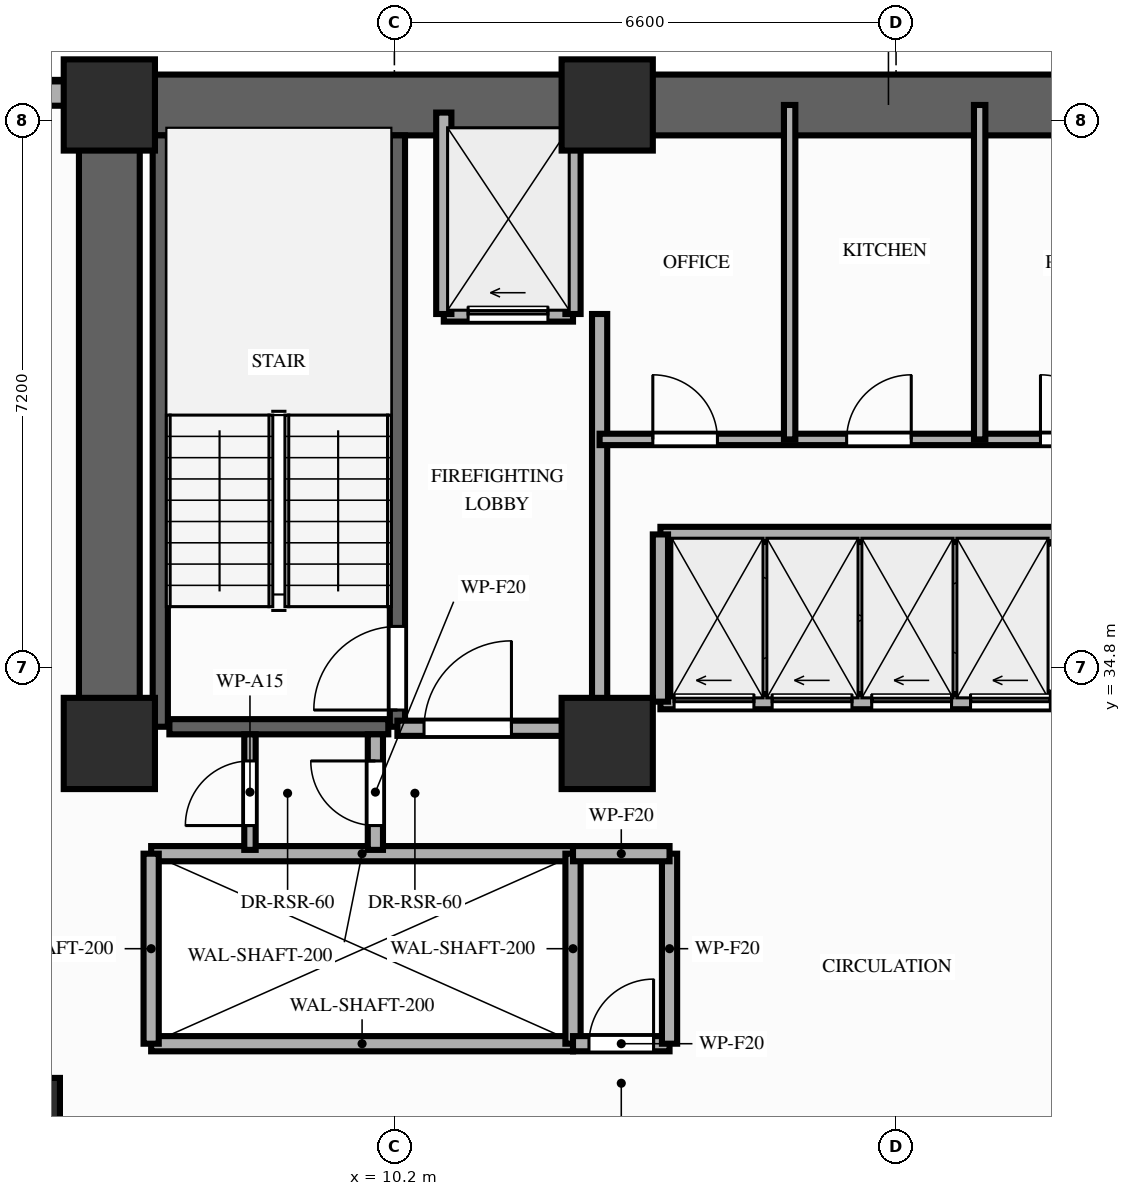
"""IFC4 building model, lengths in metres.
Left out: names, types, materials, properties, quantities, classifications, styles, units other than length and angle.
Written with IfcOpenShell. Run it as: python <this file> out.ifc"""

import sys

from ifc_helpers import new_model, si_unit, direction, frame, frame_2d, origin, origin_2d, place, context, subcontext, project, spatial, rectangle, extrude, element, fill, save


model = new_model("IFC4")
c1 = context("Model", 3, precision=1e-05, world=origin(), true_north=direction((0.0, 1.0)))
c2 = subcontext(c1, "Body", "Model", "MODEL_VIEW")
j1 = project(units=[si_unit("LENGTHUNIT", "METRE"), si_unit("PLANEANGLEUNIT", "RADIAN")], contexts=[c1])
p1 = place(None, origin())
s1 = spatial("IfcSite", under=j1, at=p1, CompositionType="ELEMENT")
p2 = place(p1, origin())
s2 = spatial("IfcBuilding", under=s1, at=p2, CompositionType="ELEMENT")
p3 = place(p2, frame((0.0, 0.0, 83.4)))
s3 = spatial("IfcBuildingStorey", under=s2, at=p3, CompositionType="ELEMENT", Elevation=83.4)
for number, where, z_axis, x_axis in (
    (1, (6.45, 33.8, 0.0), (0.0, 0.0, 1.0), (1.0, 0.0, 0.0)),
    (2, (13.0, 33.8, 0.0), (0.0, 0.0, 1.0), (1.0, 0.0, 0.0)),
    (3, (6.45, 42.2, 0.0), (0.0, 0.0, 1.0), (1.0, 0.0, 0.0)),
    (4, (13.0, 42.2, 0.0), (0.0, 0.0, 1.0), (1.0, 0.0, 0.0)),
):
    element("IfcColumn", number, at=place(p3, frame(where, z_axis=z_axis, x_axis=x_axis)), inside=s3, PredefinedType="COLUMN", context=c2, shape_type="SweptSolid", body=[
        extrude(rectangle(XDim=1.2, YDim=1.2, at=origin_2d()), origin(), (0.0, 0.0, 1.0), 3.2),
    ])
p4 = place(p3, frame((5.4, 28.8, 0.0), z_axis=(0.0, 0.0, 1.0), x_axis=(1.0, 0.0, 0.0)))
e5 = element("IfcColumn", 5, at=p4, inside=s3, PredefinedType="COLUMN", context=c2, shape_type="SweptSolid", body=[
    extrude(rectangle(XDim=0.8, YDim=1.2, at=origin_2d()), origin(), (0.0, 0.0, 1.0), 3.2),
])
p5 = place(p3, frame((6.0, 42.35, 0.0), z_axis=(0.0, 0.0, 1.0), x_axis=(-1.0, 0.0, 0.0)))
e6 = element("IfcWall", 6, at=p5, inside=s3, PredefinedType="STANDARD", context=c2, shape_type="SweptSolid", body=[
    extrude(rectangle(XDim=2.0, YDim=0.32, at=frame_2d((1.0, 0.0))), origin(), (0.0, 0.0, 1.0), 3.02),
])
p6 = place(p3, frame((6.45, 42.2, 0.0), z_axis=(0.0, 0.0, 1.0), x_axis=(1.0, 0.0, 0.0)))
e7 = element("IfcWall", 7, at=p6, inside=s3, PredefinedType="SHEAR", context=c2, shape_type="SweptSolid", body=[
    extrude(rectangle(XDim=20.45, YDim=0.8, at=frame_2d((10.225, 0.0))), origin(), (0.0, 0.0, 1.0), 3.02),
])
p7 = place(p3, frame((6.45, 33.8, 0.0), z_axis=(0.0, 0.0, 1.0), x_axis=(0.0, 1.0, 0.0)))
e8 = element("IfcWall", 8, at=p7, inside=s3, PredefinedType="SHEAR", context=c2, shape_type="SweptSolid", body=[
    extrude(rectangle(XDim=7.95, YDim=0.8, at=frame_2d((3.975, 0.0))), origin(), (0.0, 0.0, 1.0), 3.02),
])
p8 = place(p3, frame((7.12, 34.02, 0.0), z_axis=(0.0, 0.0, 1.0), x_axis=(0.0, 1.0, 0.0)))
e9 = element("IfcWall", 9, at=p8, inside=s3, PredefinedType="SHEAR", context=c2, shape_type="SweptSolid", body=[
    extrude(rectangle(XDim=7.78, YDim=0.2, at=frame_2d((3.89, 0.0))), origin(), (0.0, 0.0, 1.0), 3.02),
])
p9 = place(p3, frame((10.24, 34.02, 0.0), z_axis=(0.0, 0.0, 1.0), x_axis=(0.0, 1.0, 0.0)))
e10 = element("IfcWall", 10, at=p9, inside=s3, PredefinedType="SHEAR", context=c2, shape_type="SweptSolid", body=[
    extrude(rectangle(XDim=7.78, YDim=0.2, at=frame_2d((3.89, 0.0))), origin(), (0.0, 0.0, 1.0), 3.02),
])
p10 = place(p9, frame((0.22, 0.0, 0.0)))
e11 = element("IfcOpeningElement", 11, at=p10, cuts=e10, PredefinedType="OPENING", context=c2, shape_type="SweptSolid", body=[
    extrude(rectangle(XDim=1.1, YDim=2.15, at=frame_2d((0.55, 1.075))), frame((0.0, 0.11, 0.0), z_axis=(0.0, -1.0, 0.0), x_axis=(1.0, 0.0, 0.0)), (0.0, 0.0, 1.0), 0.22),
])
p11 = place(p3, frame((7.24, 34.02, 0.0), z_axis=(0.0, 0.0, 1.0), x_axis=(1.0, 0.0, 0.0)))
e12 = element("IfcWall", 12, at=p11, inside=s3, PredefinedType="SHEAR", context=c2, shape_type="SweptSolid", body=[
    extrude(rectangle(XDim=2.88, YDim=0.2, at=frame_2d((1.44, 0.0))), origin(), (0.0, 0.0, 1.0), 3.02),
])
for number, where, z_axis, x_axis in (
    (13, (7.0, 29.85, 0.0), (0.0, 0.0, 1.0), (1.0, 0.0, 0.0)),
    (14, (7.0, 32.35, 0.0), (0.0, 0.0, 1.0), (1.0, 0.0, 0.0)),
):
    element("IfcWall", number, at=place(p3, frame(where, z_axis=z_axis, x_axis=x_axis)), inside=s3, PredefinedType="MOVABLE", context=c2, shape_type="SweptSolid", body=[
        extrude(rectangle(XDim=5.55, YDim=0.2, at=frame_2d((2.775, 0.0))), origin(), (0.0, 0.0, 1.0), 3.02),
    ])
for number, where, z_axis, x_axis in (
    (15, (7.0, 29.85, 0.0), (0.0, 0.0, 1.0), (0.0, 1.0, 0.0)),
    (16, (12.55, 29.85, 0.0), (0.0, 0.0, 1.0), (0.0, 1.0, 0.0)),
):
    element("IfcWall", number, at=place(p3, frame(where, z_axis=z_axis, x_axis=x_axis)), inside=s3, PredefinedType="MOVABLE", context=c2, shape_type="SweptSolid", body=[
        extrude(rectangle(XDim=2.5, YDim=0.2, at=frame_2d((1.25, 0.0))), origin(), (0.0, 0.0, 1.0), 3.02),
    ])
p12 = place(p3, frame((10.85, 39.45, 0.0), z_axis=(0.0, 0.0, 1.0), x_axis=(1.0, 0.0, 0.0)))
e17 = element("IfcWall", 17, at=p12, inside=s3, PredefinedType="MOVABLE", context=c2, shape_type="SweptSolid", body=[
    extrude(rectangle(XDim=1.7, YDim=0.2, at=frame_2d((0.85, 0.0))), origin(), (0.0, 0.0, 1.0), 3.02),
])
p13 = place(p12, frame((0.32, 0.0, 0.0)))
e18 = element("IfcOpeningElement", 18, at=p13, cuts=e17, PredefinedType="OPENING", context=c2, shape_type="SweptSolid", body=[
    extrude(rectangle(XDim=1.05, YDim=2.15, at=frame_2d((0.525, 1.075))), frame((0.0, 0.11, 0.0), z_axis=(0.0, -1.0, 0.0), x_axis=(1.0, 0.0, 0.0)), (0.0, 0.0, 1.0), 0.22),
])
for number, where, z_axis, x_axis in (
    (19, (10.85, 39.45, 0.0), (0.0, 0.0, 1.0), (0.0, 1.0, 0.0)),
    (20, (12.55, 39.45, 0.0), (0.0, 0.0, 1.0), (0.0, 1.0, 0.0)),
):
    element("IfcWall", number, at=place(p3, frame(where, z_axis=z_axis, x_axis=x_axis)), inside=s3, PredefinedType="MOVABLE", context=c2, shape_type="SweptSolid", body=[
        extrude(rectangle(XDim=2.65, YDim=0.2, at=frame_2d((1.325, 0.0))), origin(), (0.0, 0.0, 1.0), 2.41),
    ])
p14 = place(p3, frame((12.9, 34.0, 0.0), z_axis=(0.0, 0.0, 1.0), x_axis=(0.0, 1.0, 0.0)))
e21 = element("IfcWall", 21, at=p14, inside=s3, PredefinedType="PARTITIONING", context=c2, shape_type="SweptSolid", body=[
    extrude(rectangle(XDim=5.45, YDim=0.2, at=frame_2d((2.725, 0.0))), origin(), (0.0, 0.0, 1.0), 2.41),
])
p15 = place(p3, frame((10.24, 34.0, 0.0), z_axis=(0.0, 0.0, 1.0), x_axis=(1.0, 0.0, 0.0)))
e22 = element("IfcWall", 22, at=p15, inside=s3, PredefinedType="PARTITIONING", context=c2, shape_type="SweptSolid", body=[
    extrude(rectangle(XDim=2.66, YDim=0.2, at=frame_2d((1.33, 0.0))), origin(), (0.0, 0.0, 1.0), 2.41),
])
p16 = place(p15, frame((0.35, 0.0, 0.0)))
e23 = element("IfcOpeningElement", 23, at=p16, cuts=e22, PredefinedType="OPENING", context=c2, shape_type="SweptSolid", body=[
    extrude(rectangle(XDim=1.15, YDim=2.15, at=frame_2d((0.575, 1.075))), frame((0.0, 0.11, 0.0), z_axis=(0.0, -1.0, 0.0), x_axis=(1.0, 0.0, 0.0)), (0.0, 0.0, 1.0), 0.22),
])
p17 = place(p3, frame((9.95, 32.4, 0.0), z_axis=(0.0, 0.0, 1.0), x_axis=(0.0, 1.0, 0.0)))
e24 = element("IfcWall", 24, at=p17, inside=s3, PredefinedType="PARTITIONING", context=c2, shape_type="SweptSolid", body=[
    extrude(rectangle(XDim=1.52, YDim=0.2, at=frame_2d((0.76, 0.0))), origin(), (0.0, 0.0, 1.0), 2.41),
])
p18 = place(p17, frame((0.32, 0.0, 0.0)))
e25 = element("IfcOpeningElement", 25, at=p18, cuts=e24, PredefinedType="OPENING", context=c2, shape_type="SweptSolid", body=[
    extrude(rectangle(XDim=0.85, YDim=2.05, at=frame_2d((0.425, 1.025))), frame((0.0, 0.11, 0.0), z_axis=(0.0, -1.0, 0.0), x_axis=(1.0, 0.0, 0.0)), (0.0, 0.0, 1.0), 0.22),
])
p19 = place(p3, frame((8.3, 32.4, 0.0), z_axis=(0.0, 0.0, 1.0), x_axis=(0.0, 1.0, 0.0)))
e26 = element("IfcWall", 26, at=p19, inside=s3, PredefinedType="PARTITIONING", context=c2, shape_type="SweptSolid", body=[
    extrude(rectangle(XDim=1.52, YDim=0.15, at=frame_2d((0.76, 0.0))), origin(), (0.0, 0.0, 1.0), 2.41),
])
p20 = place(p19, frame((0.32, 0.0, 0.0)))
e27 = element("IfcOpeningElement", 27, at=p20, cuts=e26, PredefinedType="OPENING", context=c2, shape_type="SweptSolid", body=[
    extrude(rectangle(XDim=0.85, YDim=2.05, at=frame_2d((0.425, 1.025))), frame((0.0, 0.085, 0.0), z_axis=(0.0, -1.0, 0.0), x_axis=(1.0, 0.0, 0.0)), (0.0, 0.0, 1.0), 0.17),
])
p21 = place(p3, frame((12.55, 29.85, 0.0), z_axis=(0.0, 0.0, 1.0), x_axis=(1.0, 0.0, 0.0)))
e28 = element("IfcWall", 28, at=p21, inside=s3, PredefinedType="PARTITIONING", context=c2, shape_type="SweptSolid", body=[
    extrude(rectangle(XDim=1.27, YDim=0.2, at=frame_2d((0.635, 0.0))), origin(), (0.0, 0.0, 1.0), 3.02),
])
p22 = place(p21, frame((0.21, 0.0, 0.0)))
e29 = element("IfcOpeningElement", 29, at=p22, cuts=e28, PredefinedType="OPENING", context=c2, shape_type="SweptSolid", body=[
    extrude(rectangle(XDim=0.85, YDim=2.05, at=frame_2d((0.425, 1.025))), frame((0.0, 0.11, 0.0), z_axis=(0.0, -1.0, 0.0), x_axis=(1.0, 0.0, 0.0)), (0.0, 0.0, 1.0), 0.22),
])
p23 = place(p3, frame((13.82, 29.85, 0.0), z_axis=(0.0, 0.0, 1.0), x_axis=(0.0, 1.0, 0.0)))
e30 = element("IfcWall", 30, at=p23, inside=s3, PredefinedType="PARTITIONING", context=c2, shape_type="SweptSolid", body=[
    extrude(rectangle(XDim=2.5, YDim=0.2, at=frame_2d((1.25, 0.0))), origin(), (0.0, 0.0, 1.0), 3.02),
])
p24 = place(p3, frame((12.55, 32.35, 0.0), z_axis=(0.0, 0.0, 1.0), x_axis=(1.0, 0.0, 0.0)))
e31 = element("IfcWall", 31, at=p24, inside=s3, PredefinedType="PARTITIONING", context=c2, shape_type="SweptSolid", body=[
    extrude(rectangle(XDim=1.27, YDim=0.2, at=frame_2d((0.635, 0.0))), origin(), (0.0, 0.0, 1.0), 3.02),
])
p25 = place(p3, frame((12.9, 37.8, 0.0), z_axis=(0.0, 0.0, 1.0), x_axis=(1.0, 0.0, 0.0)))
e32 = element("IfcWall", 32, at=p25, inside=s3, PredefinedType="PARTITIONING", context=c2, shape_type="SweptSolid", body=[
    extrude(rectangle(XDim=7.6, YDim=0.15, at=frame_2d((3.8, 0.0))), origin(), (0.0, 0.0, 1.0), 3.02),
])
p26 = place(p25, frame((0.7, 0.0, 0.0)))
e33 = element("IfcOpeningElement", 33, at=p26, cuts=e32, PredefinedType="OPENING", context=c2, shape_type="SweptSolid", body=[
    extrude(rectangle(XDim=0.85, YDim=2.05, at=frame_2d((0.425, 1.025))), frame((0.0, 0.085, 0.0), z_axis=(0.0, -1.0, 0.0), x_axis=(1.0, 0.0, 0.0)), (0.0, 0.0, 1.0), 0.17),
])
p27 = place(p25, frame((3.25, 0.0, 0.0)))
e34 = element("IfcOpeningElement", 34, at=p27, cuts=e32, PredefinedType="OPENING", context=c2, shape_type="SweptSolid", body=[
    extrude(rectangle(XDim=0.85, YDim=2.05, at=frame_2d((0.425, 1.025))), frame((0.0, 0.085, 0.0), z_axis=(0.0, -1.0, 0.0), x_axis=(1.0, 0.0, 0.0)), (0.0, 0.0, 1.0), 0.17),
])
p28 = place(p25, frame((5.8, 0.0, 0.0)))
e35 = element("IfcOpeningElement", 35, at=p28, cuts=e32, PredefinedType="OPENING", context=c2, shape_type="SweptSolid", body=[
    extrude(rectangle(XDim=0.85, YDim=2.05, at=frame_2d((0.425, 1.025))), frame((0.0, 0.085, 0.0), z_axis=(0.0, -1.0, 0.0), x_axis=(1.0, 0.0, 0.0)), (0.0, 0.0, 1.0), 0.17),
])
for number, where, z_axis, x_axis in (
    (36, (15.4, 37.8, 0.0), (0.0, 0.0, 1.0), (0.0, 1.0, 0.0)),
    (37, (17.9, 37.8, 0.0), (0.0, 0.0, 1.0), (0.0, 1.0, 0.0)),
):
    element("IfcWall", number, at=place(p3, frame(where, z_axis=z_axis, x_axis=x_axis)), inside=s3, PredefinedType="PARTITIONING", context=c2, shape_type="SweptSolid", body=[
        extrude(rectangle(XDim=4.4, YDim=0.15, at=frame_2d((2.2, 0.0))), origin(), (0.0, 0.0, 1.0), 2.41),
    ])
p29 = place(p3, frame((13.7, 34.35, 0.0), z_axis=(0.0, 0.0, 1.0), x_axis=(1.0, 0.0, 0.0)))
e38 = element("IfcWall", 38, at=p29, inside=s3, PredefinedType="MOVABLE", context=c2, shape_type="SweptSolid", body=[
    extrude(rectangle(XDim=5.42, YDim=0.2, at=frame_2d((2.71, 0.0))), origin(), (0.0, 0.0, 1.0), 3.02),
])
p30 = place(p29, frame((0.18, 0.0, 0.0)))
e39 = element("IfcOpeningElement", 39, at=p30, cuts=e38, PredefinedType="OPENING", context=c2, shape_type="SweptSolid", body=[
    extrude(rectangle(XDim=1.05, YDim=2.15, at=frame_2d((0.525, 1.075))), frame((0.0, 0.11, 0.0), z_axis=(0.0, -1.0, 0.0), x_axis=(1.0, 0.0, 0.0)), (0.0, 0.0, 1.0), 0.22),
])
p31 = place(p29, frame((1.47, 0.0, 0.0)))
e40 = element("IfcOpeningElement", 40, at=p31, cuts=e38, PredefinedType="OPENING", context=c2, shape_type="SweptSolid", body=[
    extrude(rectangle(XDim=1.05, YDim=2.15, at=frame_2d((0.525, 1.075))), frame((0.0, 0.11, 0.0), z_axis=(0.0, -1.0, 0.0), x_axis=(1.0, 0.0, 0.0)), (0.0, 0.0, 1.0), 0.22),
])
p32 = place(p29, frame((2.78, 0.0, 0.0)))
e41 = element("IfcOpeningElement", 41, at=p32, cuts=e38, PredefinedType="OPENING", context=c2, shape_type="SweptSolid", body=[
    extrude(rectangle(XDim=1.05, YDim=2.15, at=frame_2d((0.525, 1.075))), frame((0.0, 0.11, 0.0), z_axis=(0.0, -1.0, 0.0), x_axis=(1.0, 0.0, 0.0)), (0.0, 0.0, 1.0), 0.22),
])
p33 = place(p29, frame((4.08, 0.0, 0.0)))
e42 = element("IfcOpeningElement", 42, at=p33, cuts=e38, PredefinedType="OPENING", context=c2, shape_type="SweptSolid", body=[
    extrude(rectangle(XDim=1.05, YDim=2.15, at=frame_2d((0.525, 1.075))), frame((0.0, 0.11, 0.0), z_axis=(0.0, -1.0, 0.0), x_axis=(1.0, 0.0, 0.0)), (0.0, 0.0, 1.0), 0.22),
])
p34 = place(p3, frame((13.7, 36.55, 0.0), z_axis=(0.0, 0.0, 1.0), x_axis=(1.0, 0.0, 0.0)))
e43 = element("IfcWall", 43, at=p34, inside=s3, PredefinedType="MOVABLE", context=c2, shape_type="SweptSolid", body=[
    extrude(rectangle(XDim=5.42, YDim=0.2, at=frame_2d((2.71, 0.0))), origin(), (0.0, 0.0, 1.0), 3.02),
])
p35 = place(p3, frame((13.7, 34.35, 0.0), z_axis=(0.0, 0.0, 1.0), x_axis=(0.0, 1.0, 0.0)))
e44 = element("IfcWall", 44, at=p35, inside=s3, PredefinedType="MOVABLE", context=c2, shape_type="SweptSolid", body=[
    extrude(rectangle(XDim=2.2, YDim=0.2, at=frame_2d((1.1, 0.0))), origin(), (0.0, 0.0, 1.0), 3.02),
])
p36 = place(p10, origin())
e45 = element("IfcDoor", 45, at=p36, inside=s3, OperationType="SINGLE_SWING_LEFT", PredefinedType="DOOR", context=c2, shape_type="SweptSolid", body=[
    extrude(rectangle(XDim=1.1, YDim=2.15, at=frame_2d((0.55, 1.075))), frame((0.0, 0.025, 0.0), z_axis=(0.0, -1.0, 0.0), x_axis=(1.0, 0.0, 0.0)), (0.0, 0.0, 1.0), 0.05),
])
fill(e11, e45)
p37 = place(p13, origin())
e46 = element("IfcDoor", 46, at=p37, inside=s3, OperationType="SLIDING_TO_LEFT", PredefinedType="DOOR", context=c2, shape_type="SweptSolid", body=[
    extrude(rectangle(XDim=1.05, YDim=2.15, at=frame_2d((0.525, 1.075))), frame((0.0, 0.025, 0.0), z_axis=(0.0, -1.0, 0.0), x_axis=(1.0, 0.0, 0.0)), (0.0, 0.0, 1.0), 0.05),
])
fill(e18, e46)
p38 = place(p16, origin())
e47 = element("IfcDoor", 47, at=p38, inside=s3, OperationType="SINGLE_SWING_RIGHT", PredefinedType="DOOR", context=c2, shape_type="SweptSolid", body=[
    extrude(rectangle(XDim=1.15, YDim=2.15, at=frame_2d((0.575, 1.075))), frame((0.0, 0.025, 0.0), z_axis=(0.0, -1.0, 0.0), x_axis=(1.0, 0.0, 0.0)), (0.0, 0.0, 1.0), 0.05),
])
fill(e23, e47)
p39 = place(p18, origin())
e48 = element("IfcDoor", 48, at=p39, inside=s3, OperationType="SINGLE_SWING_RIGHT", PredefinedType="DOOR", context=c2, shape_type="SweptSolid", body=[
    extrude(rectangle(XDim=0.85, YDim=2.05, at=frame_2d((0.425, 1.025))), frame((0.0, 0.025, 0.0), z_axis=(0.0, -1.0, 0.0), x_axis=(1.0, 0.0, 0.0)), (0.0, 0.0, 1.0), 0.05),
])
fill(e25, e48)
p40 = place(p20, origin())
e49 = element("IfcDoor", 49, at=p40, inside=s3, OperationType="SINGLE_SWING_LEFT", PredefinedType="DOOR", context=c2, shape_type="SweptSolid", body=[
    extrude(rectangle(XDim=0.85, YDim=2.05, at=frame_2d((0.425, 1.025))), frame((0.0, 0.025, 0.0), z_axis=(0.0, -1.0, 0.0), x_axis=(1.0, 0.0, 0.0)), (0.0, 0.0, 1.0), 0.05),
])
fill(e27, e49)
p41 = place(p22, origin())
e50 = element("IfcDoor", 50, at=p41, inside=s3, OperationType="SINGLE_SWING_RIGHT", PredefinedType="DOOR", context=c2, shape_type="SweptSolid", body=[
    extrude(rectangle(XDim=0.85, YDim=2.05, at=frame_2d((0.425, 1.025))), frame((0.0, 0.025, 0.0), z_axis=(0.0, -1.0, 0.0), x_axis=(1.0, 0.0, 0.0)), (0.0, 0.0, 1.0), 0.05),
])
fill(e29, e50)
p42 = place(p26, origin())
e51 = element("IfcDoor", 51, at=p42, inside=s3, OperationType="SINGLE_SWING_LEFT", PredefinedType="DOOR", context=c2, shape_type="SweptSolid", body=[
    extrude(rectangle(XDim=0.85, YDim=2.05, at=frame_2d((0.425, 1.025))), frame((0.0, 0.025, 0.0), z_axis=(0.0, -1.0, 0.0), x_axis=(1.0, 0.0, 0.0)), (0.0, 0.0, 1.0), 0.05),
])
fill(e33, e51)
p43 = place(p27, origin())
e52 = element("IfcDoor", 52, at=p43, inside=s3, OperationType="SINGLE_SWING_RIGHT", PredefinedType="DOOR", context=c2, shape_type="SweptSolid", body=[
    extrude(rectangle(XDim=0.85, YDim=2.05, at=frame_2d((0.425, 1.025))), frame((0.0, 0.025, 0.0), z_axis=(0.0, -1.0, 0.0), x_axis=(1.0, 0.0, 0.0)), (0.0, 0.0, 1.0), 0.05),
])
fill(e34, e52)
p44 = place(p28, origin())
e53 = element("IfcDoor", 53, at=p44, inside=s3, OperationType="SINGLE_SWING_LEFT", PredefinedType="DOOR", context=c2, shape_type="SweptSolid", body=[
    extrude(rectangle(XDim=0.85, YDim=2.05, at=frame_2d((0.425, 1.025))), frame((0.0, 0.025, 0.0), z_axis=(0.0, -1.0, 0.0), x_axis=(1.0, 0.0, 0.0)), (0.0, 0.0, 1.0), 0.05),
])
fill(e35, e53)
p45 = place(p30, origin())
e54 = element("IfcDoor", 54, at=p45, inside=s3, OperationType="SLIDING_TO_LEFT", PredefinedType="DOOR", context=c2, shape_type="SweptSolid", body=[
    extrude(rectangle(XDim=1.05, YDim=2.15, at=frame_2d((0.525, 1.075))), frame((0.0, 0.025, 0.0), z_axis=(0.0, -1.0, 0.0), x_axis=(1.0, 0.0, 0.0)), (0.0, 0.0, 1.0), 0.05),
])
fill(e39, e54)
p46 = place(p31, origin())
e55 = element("IfcDoor", 55, at=p46, inside=s3, OperationType="SLIDING_TO_LEFT", PredefinedType="DOOR", context=c2, shape_type="SweptSolid", body=[
    extrude(rectangle(XDim=1.05, YDim=2.15, at=frame_2d((0.525, 1.075))), frame((0.0, 0.025, 0.0), z_axis=(0.0, -1.0, 0.0), x_axis=(1.0, 0.0, 0.0)), (0.0, 0.0, 1.0), 0.05),
])
fill(e40, e55)
p47 = place(p32, origin())
e56 = element("IfcDoor", 56, at=p47, inside=s3, OperationType="SLIDING_TO_LEFT", PredefinedType="DOOR", context=c2, shape_type="SweptSolid", body=[
    extrude(rectangle(XDim=1.05, YDim=2.15, at=frame_2d((0.525, 1.075))), frame((0.0, 0.025, 0.0), z_axis=(0.0, -1.0, 0.0), x_axis=(1.0, 0.0, 0.0)), (0.0, 0.0, 1.0), 0.05),
])
fill(e41, e56)
p48 = place(p33, origin())
e57 = element("IfcDoor", 57, at=p48, inside=s3, OperationType="SLIDING_TO_LEFT", PredefinedType="DOOR", context=c2, shape_type="SweptSolid", body=[
    extrude(rectangle(XDim=1.05, YDim=2.15, at=frame_2d((0.525, 1.075))), frame((0.0, 0.025, 0.0), z_axis=(0.0, -1.0, 0.0), x_axis=(1.0, 0.0, 0.0)), (0.0, 0.0, 1.0), 0.05),
])
fill(e42, e57)
save(model, sys.argv[1])
